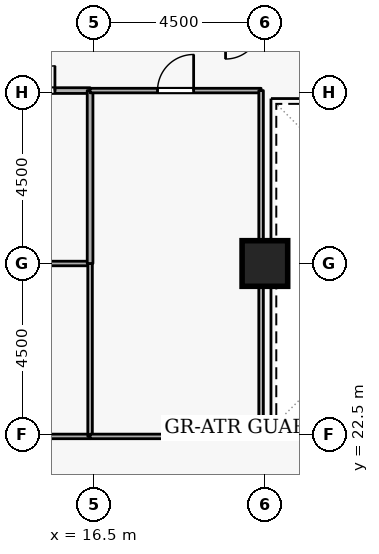
"""IFC4 building model, lengths in metres.
Left out: names, types, materials, properties, quantities, classifications, styles, units other than length and angle.
Written with IfcOpenShell. Run it as: python <this file> out.ifc"""

import sys

from ifc_helpers import new_model, si_unit, direction, frame, frame_2d, origin, origin_2d, place, context, subcontext, project, spatial, rectangle, extrude, element, fill, save


model = new_model("IFC4")
c1 = context("Model", 3, precision=1e-05, world=origin(), true_north=direction((0.0, 1.0)))
c2 = subcontext(c1, "Body", "Model", "MODEL_VIEW")
j1 = project(units=[si_unit("LENGTHUNIT", "METRE"), si_unit("PLANEANGLEUNIT", "RADIAN")], contexts=[c1])
p1 = place(None, origin())
s1 = spatial("IfcSite", under=j1, at=p1, CompositionType="ELEMENT")
p2 = place(p1, origin())
s2 = spatial("IfcBuilding", under=s1, at=p2, CompositionType="ELEMENT")
p3 = place(p2, frame((0.0, 0.0, 134.1)))
s3 = spatial("IfcBuildingStorey", under=s2, at=p3, CompositionType="ELEMENT", Elevation=134.1)
p4 = place(p3, frame((21.0, 27.0, 0.0), z_axis=(0.0, 0.0, 1.0), x_axis=(1.0, 0.0, 0.0)))
e1 = element("IfcColumn", 1, at=p4, inside=s3, PredefinedType="COLUMN", context=c2, shape_type="SweptSolid", body=[
    extrude(rectangle(XDim=1.2, YDim=1.2, at=origin_2d()), origin(), (0.0, 0.0, 1.0), 3.6),
])
p5 = place(p3, frame((16.4, 22.45, 0.0), z_axis=(0.0, 0.0, 1.0), x_axis=(-1.0, 0.0, 0.0)))
e2 = element("IfcWall", 2, at=p5, inside=s3, PredefinedType="PARTITIONING", context=c2, shape_type="SweptSolid", body=[
    extrude(rectangle(XDim=1.2, YDim=0.12, at=frame_2d((0.6, 0.0))), origin(), (0.0, 0.0, 1.0), 3.34),
])
p6 = place(p3, frame((1.78, 27.0, 0.0), z_axis=(0.0, 0.0, 1.0), x_axis=(1.0, 0.0, 0.0)))
e3 = element("IfcWall", 3, at=p6, inside=s3, PredefinedType="PARTITIONING", context=c2, shape_type="SweptSolid", body=[
    extrude(rectangle(XDim=14.62, YDim=0.12, at=frame_2d((7.31, 0.0))), origin(), (0.0, 0.0, 1.0), 2.878),
])
p7 = place(p3, frame((16.4, 27.0, 0.0), z_axis=(0.0, 0.0, 1.0), x_axis=(0.0, -1.0, 0.0)))
e4 = element("IfcWall", 4, at=p7, inside=s3, PredefinedType="PARTITIONING", context=c2, shape_type="SweptSolid", body=[
    extrude(rectangle(XDim=4.55, YDim=0.12, at=frame_2d((2.275, 0.0))), origin(), (0.0, 0.0, 1.0), 3.34),
])
p8 = place(p3, frame((13.25, 31.55, 0.0), z_axis=(0.0, 0.0, 1.0), x_axis=(1.0, 0.0, 0.0)))
e5 = element("IfcWall", 5, at=p8, inside=s3, PredefinedType="PARTITIONING", context=c2, shape_type="SweptSolid", body=[
    extrude(rectangle(XDim=3.15, YDim=0.15, at=frame_2d((1.575, 0.0))), origin(), (0.0, 0.0, 1.0), 3.34),
])
p9 = place(p8, frame((0.925, 0.0, 0.0)))
e6 = element("IfcOpeningElement", 6, at=p9, cuts=e5, PredefinedType="OPENING", context=c2, shape_type="SweptSolid", body=[
    extrude(rectangle(XDim=1.3, YDim=2.12, at=frame_2d((0.65, 1.06))), frame((0.0, 0.085, 0.0), z_axis=(0.0, -1.0, 0.0), x_axis=(1.0, 0.0, 0.0)), (0.0, 0.0, 1.0), 0.17),
])
p10 = place(p3, frame((16.4, 31.55, 0.0), z_axis=(0.0, 0.0, 1.0), x_axis=(0.0, -1.0, 0.0)))
e7 = element("IfcWall", 7, at=p10, inside=s3, PredefinedType="PARTITIONING", context=c2, shape_type="SweptSolid", body=[
    extrude(rectangle(XDim=4.55, YDim=0.15, at=frame_2d((2.275, 0.0))), origin(), (0.0, 0.0, 1.0), 3.34),
])
p11 = place(p3, frame((16.4, 31.55, 0.0), z_axis=(0.0, 0.0, 1.0), x_axis=(1.0, 0.0, 0.0)))
e8 = element("IfcWall", 8, at=p11, inside=s3, PredefinedType="PARTITIONING", context=c2, shape_type="SweptSolid", body=[
    extrude(rectangle(XDim=4.5, YDim=0.12, at=frame_2d((2.25, 0.0))), origin(), (0.0, 0.0, 1.0), 3.34),
])
p12 = place(p11, frame((1.775, 0.0, 0.0)))
e9 = element("IfcOpeningElement", 9, at=p12, cuts=e8, PredefinedType="OPENING", context=c2, shape_type="SweptSolid", body=[
    extrude(rectangle(XDim=0.95, YDim=2.1, at=frame_2d((0.475, 1.05))), frame((0.0, 0.07, 0.0), z_axis=(0.0, -1.0, 0.0), x_axis=(1.0, 0.0, 0.0)), (0.0, 0.0, 1.0), 0.14),
])
p13 = place(p3, frame((20.9, 31.55, 0.0), z_axis=(0.0, 0.0, 1.0), x_axis=(0.0, -1.0, 0.0)))
e10 = element("IfcWall", 10, at=p13, inside=s3, PredefinedType="PARTITIONING", context=c2, shape_type="SweptSolid", body=[
    extrude(rectangle(XDim=9.1, YDim=0.12, at=frame_2d((4.55, 0.0))), origin(), (0.0, 0.0, 1.0), 3.34),
])
p14 = place(p3, frame((20.9, 22.45, 0.0), z_axis=(0.0, 0.0, 1.0), x_axis=(-1.0, 0.0, 0.0)))
e11 = element("IfcWall", 11, at=p14, inside=s3, PredefinedType="PARTITIONING", context=c2, shape_type="SweptSolid", body=[
    extrude(rectangle(XDim=4.5, YDim=0.12, at=frame_2d((2.25, 0.0))), origin(), (0.0, 0.0, 1.0), 3.34),
])
p15 = place(p9, origin())
e12 = element("IfcDoor", 12, at=p15, inside=s3, OperationType="DOUBLE_DOOR_SINGLE_SWING", PredefinedType="DOOR", context=c2, shape_type="SweptSolid", body=[
    extrude(rectangle(XDim=1.3, YDim=2.12, at=frame_2d((0.65, 1.06))), frame((0.0, 0.025, 0.0), z_axis=(0.0, -1.0, 0.0), x_axis=(1.0, 0.0, 0.0)), (0.0, 0.0, 1.0), 0.05),
])
fill(e6, e12)
p16 = place(p12, origin())
e13 = element("IfcDoor", 13, at=p16, inside=s3, OperationType="SINGLE_SWING_RIGHT", PredefinedType="DOOR", context=c2, shape_type="SweptSolid", body=[
    extrude(rectangle(XDim=0.95, YDim=2.1, at=frame_2d((0.475, 1.05))), frame((0.0, 0.025, 0.0), z_axis=(0.0, -1.0, 0.0), x_axis=(1.0, 0.0, 0.0)), (0.0, 0.0, 1.0), 0.05),
])
fill(e9, e13)
save(model, sys.argv[1])
